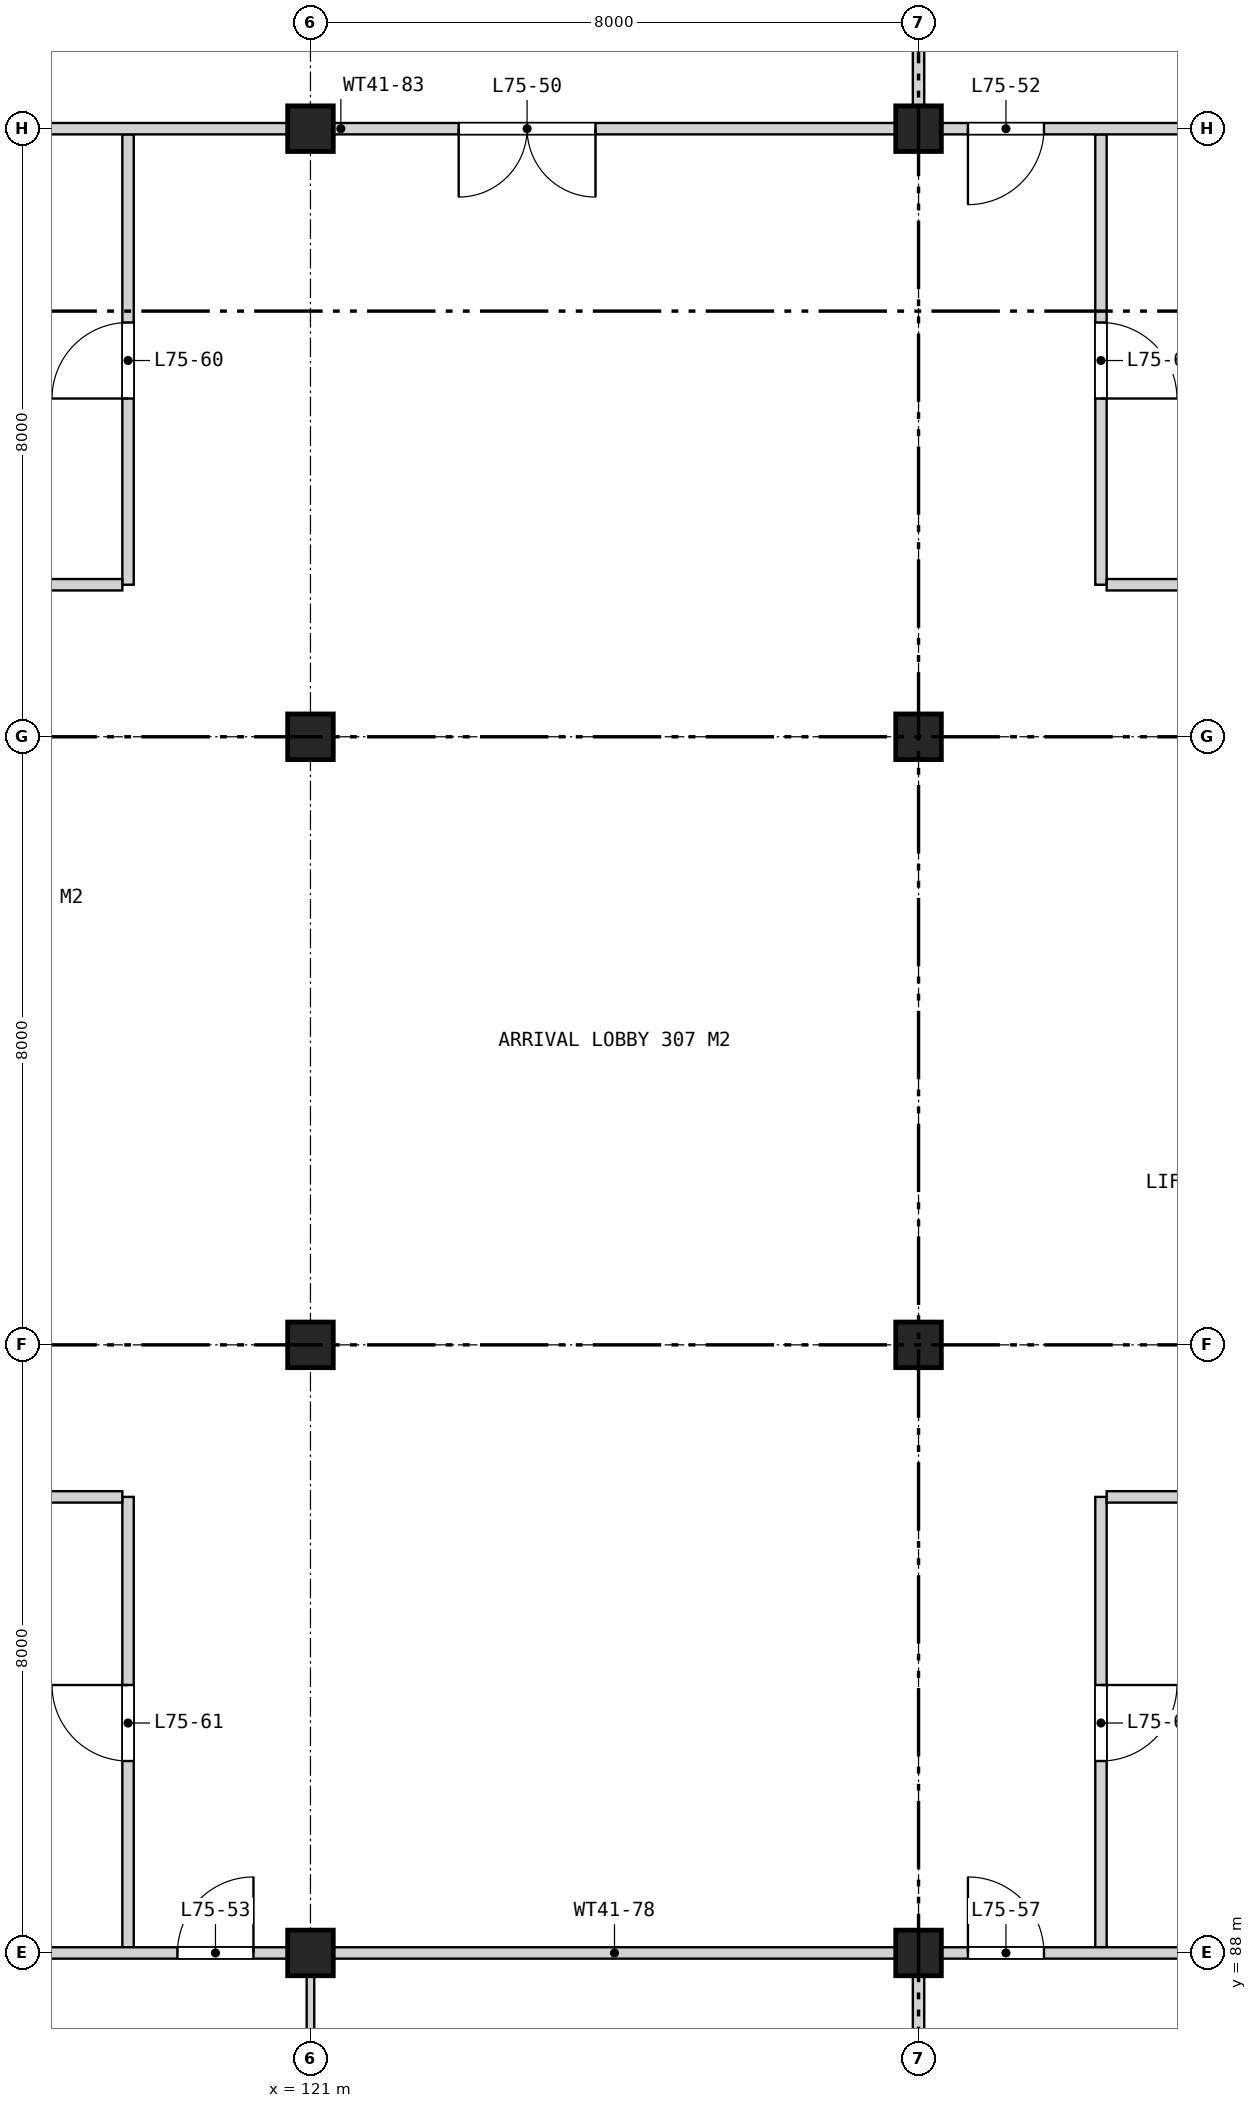
"""IFC4 building model, lengths in metres.
Left out: names, types, materials, properties, quantities, classifications, styles, units other than length and angle.
Written with IfcOpenShell. Run it as: python <this file> out.ifc"""

import sys

from ifc_helpers import new_model, si_unit, direction, frame, frame_2d, origin, origin_2d, place, context, subcontext, project, spatial, rectangle, extrude, element, fill, save


model = new_model("IFC4")
c1 = context("Model", 3, precision=1e-05, world=origin(), true_north=direction((0.0, 1.0)))
c2 = subcontext(c1, "Body", "Model", "MODEL_VIEW")
j1 = project(units=[si_unit("LENGTHUNIT", "METRE"), si_unit("PLANEANGLEUNIT", "RADIAN")], contexts=[c1])
p1 = place(None, origin())
s1 = spatial("IfcSite", under=j1, at=p1, CompositionType="ELEMENT")
p2 = place(p1, origin())
s2 = spatial("IfcBuilding", under=s1, at=p2, CompositionType="ELEMENT")
p3 = place(p2, frame((0.0, 0.0, 344.9)))
s3 = spatial("IfcBuildingStorey", under=s2, at=p3, CompositionType="ELEMENT", Elevation=344.9)
for number, where, z_axis, x_axis in (
    (1, (121.0, 88.0, 0.0), (0.0, 0.0, 1.0), (1.0, 0.0, 0.0)),
    (2, (121.0, 96.0, 0.0), (0.0, 0.0, 1.0), (1.0, 0.0, 0.0)),
    (3, (121.0, 104.0, 0.0), (0.0, 0.0, 1.0), (1.0, 0.0, 0.0)),
    (4, (121.0, 112.0, 0.0), (0.0, 0.0, 1.0), (1.0, 0.0, 0.0)),
    (5, (129.0, 88.0, 0.0), (0.0, 0.0, 1.0), (1.0, 0.0, 0.0)),
    (6, (129.0, 96.0, 0.0), (0.0, 0.0, 1.0), (1.0, 0.0, 0.0)),
    (7, (129.0, 104.0, 0.0), (0.0, 0.0, 1.0), (1.0, 0.0, 0.0)),
    (8, (129.0, 112.0, 0.0), (0.0, 0.0, 1.0), (1.0, 0.0, 0.0)),
):
    element("IfcColumn", number, at=place(p3, frame(where, z_axis=z_axis, x_axis=x_axis)), inside=s3, PredefinedType="COLUMN", context=c2, shape_type="SweptSolid", body=[
        extrude(rectangle(XDim=0.6, YDim=0.6, at=origin_2d()), origin(), (0.0, 0.0, 1.0), 4.2),
    ])
p4 = place(p3, frame((118.6, 88.075, 0.0), z_axis=(0.0, 0.0, 1.0), x_axis=(0.0, 1.0, 0.0)))
e9 = element("IfcWall", 9, at=p4, inside=s3, PredefinedType="PARTITIONING", context=c2, shape_type="SweptSolid", body=[
    extrude(rectangle(XDim=5.925, YDim=0.15, at=frame_2d((2.962, 0.0))), origin(), (0.0, 0.0, 1.0), 3.396),
])
p5 = place(p4, frame((2.45, 0.0, 0.0)))
e10 = element("IfcOpeningElement", 10, at=p5, cuts=e9, PredefinedType="OPENING", context=c2, shape_type="SweptSolid", body=[
    extrude(rectangle(XDim=1.0, YDim=2.1, at=frame_2d((0.5, 1.05))), frame((0.0, 0.085, 0.0), z_axis=(0.0, -1.0, 0.0), x_axis=(1.0, 0.0, 0.0)), (0.0, 0.0, 1.0), 0.17),
])
p6 = place(p3, frame((118.6, 106.0, 0.0), z_axis=(0.0, 0.0, 1.0), x_axis=(0.0, 1.0, 0.0)))
e11 = element("IfcWall", 11, at=p6, inside=s3, PredefinedType="PARTITIONING", context=c2, shape_type="SweptSolid", body=[
    extrude(rectangle(XDim=5.925, YDim=0.15, at=frame_2d((2.962, 0.0))), origin(), (0.0, 0.0, 1.0), 3.396),
])
p7 = place(p6, frame((2.45, 0.0, 0.0)))
e12 = element("IfcOpeningElement", 12, at=p7, cuts=e11, PredefinedType="OPENING", context=c2, shape_type="SweptSolid", body=[
    extrude(rectangle(XDim=1.0, YDim=2.1, at=frame_2d((0.5, 1.05))), frame((0.0, 0.085, 0.0), z_axis=(0.0, -1.0, 0.0), x_axis=(1.0, 0.0, 0.0)), (0.0, 0.0, 1.0), 0.17),
])
p8 = place(p3, frame((121.0, 71.78, 0.0), z_axis=(0.0, 0.0, 1.0), x_axis=(0.0, 1.0, 0.0)))
e13 = element("IfcWall", 13, at=p8, inside=s3, PredefinedType="PARTITIONING", context=c2, shape_type="SweptSolid", body=[
    extrude(rectangle(XDim=16.145, YDim=0.1, at=frame_2d((8.073, 0.0))), origin(), (0.0, 0.0, 1.0), 3.396),
])
p9 = place(p8, frame((5.77, 0.0, 0.0)))
e14 = element("IfcOpeningElement", 14, at=p9, cuts=e13, PredefinedType="OPENING", context=c2, shape_type="SweptSolid", body=[
    extrude(rectangle(XDim=0.9, YDim=2.1, at=frame_2d((0.45, 1.05))), frame((0.0, 0.06, 0.0), z_axis=(0.0, -1.0, 0.0), x_axis=(1.0, 0.0, 0.0)), (0.0, 0.0, 1.0), 0.12),
])
p10 = place(p8, frame((1.77, 0.0, 0.0)))
e15 = element("IfcOpeningElement", 15, at=p10, cuts=e13, PredefinedType="OPENING", context=c2, shape_type="SweptSolid", body=[
    extrude(rectangle(XDim=0.9, YDim=2.1, at=frame_2d((0.45, 1.05))), frame((0.0, 0.06, 0.0), z_axis=(0.0, -1.0, 0.0), x_axis=(1.0, 0.0, 0.0)), (0.0, 0.0, 1.0), 0.12),
])
p11 = place(p8, frame((11.77, 0.0, 0.0)))
e16 = element("IfcOpeningElement", 16, at=p11, cuts=e13, PredefinedType="OPENING", context=c2, shape_type="SweptSolid", body=[
    extrude(rectangle(XDim=0.9, YDim=2.1, at=frame_2d((0.45, 1.05))), frame((0.0, 0.06, 0.0), z_axis=(0.0, -1.0, 0.0), x_axis=(1.0, 0.0, 0.0)), (0.0, 0.0, 1.0), 0.12),
])
p12 = place(p3, frame((129.0, 71.78, 0.0), z_axis=(0.0, 0.0, 1.0), x_axis=(0.0, 1.0, 0.0)))
e17 = element("IfcWall", 17, at=p12, inside=s3, PredefinedType="PARTITIONING", context=c2, shape_type="SweptSolid", body=[
    extrude(rectangle(XDim=16.145, YDim=0.15, at=frame_2d((8.073, 0.0))), origin(), (0.0, 0.0, 1.0), 3.396),
])
p13 = place(p12, frame((3.77, 0.0, 0.0)))
e18 = element("IfcOpeningElement", 18, at=p13, cuts=e17, PredefinedType="OPENING", context=c2, shape_type="SweptSolid", body=[
    extrude(rectangle(XDim=0.9, YDim=2.1, at=frame_2d((0.45, 1.05))), frame((0.0, 0.085, 0.0), z_axis=(0.0, -1.0, 0.0), x_axis=(1.0, 0.0, 0.0)), (0.0, 0.0, 1.0), 0.17),
])
p14 = place(p3, frame((129.0, 112.075, 0.0), z_axis=(0.0, 0.0, 1.0), x_axis=(0.0, 1.0, 0.0)))
e19 = element("IfcWall", 19, at=p14, inside=s3, PredefinedType="PARTITIONING", context=c2, shape_type="SweptSolid", body=[
    extrude(rectangle(XDim=9.925, YDim=0.15, at=frame_2d((4.962, 0.0))), origin(), (0.0, 0.0, 1.0), 3.396),
])
p15 = place(p3, frame((131.4, 88.075, 0.0), z_axis=(0.0, 0.0, 1.0), x_axis=(0.0, 1.0, 0.0)))
e20 = element("IfcWall", 20, at=p15, inside=s3, PredefinedType="PARTITIONING", context=c2, shape_type="SweptSolid", body=[
    extrude(rectangle(XDim=5.925, YDim=0.15, at=frame_2d((2.962, 0.0))), origin(), (0.0, 0.0, 1.0), 3.396),
])
p16 = place(p15, frame((2.45, 0.0, 0.0)))
e21 = element("IfcOpeningElement", 21, at=p16, cuts=e20, PredefinedType="OPENING", context=c2, shape_type="SweptSolid", body=[
    extrude(rectangle(XDim=1.0, YDim=2.1, at=frame_2d((0.5, 1.05))), frame((0.0, 0.085, 0.0), z_axis=(0.0, -1.0, 0.0), x_axis=(1.0, 0.0, 0.0)), (0.0, 0.0, 1.0), 0.17),
])
p17 = place(p3, frame((131.4, 106.0, 0.0), z_axis=(0.0, 0.0, 1.0), x_axis=(0.0, 1.0, 0.0)))
e22 = element("IfcWall", 22, at=p17, inside=s3, PredefinedType="PARTITIONING", context=c2, shape_type="SweptSolid", body=[
    extrude(rectangle(XDim=5.925, YDim=0.15, at=frame_2d((2.962, 0.0))), origin(), (0.0, 0.0, 1.0), 3.396),
])
p18 = place(p17, frame((2.45, 0.0, 0.0)))
e23 = element("IfcOpeningElement", 23, at=p18, cuts=e22, PredefinedType="OPENING", context=c2, shape_type="SweptSolid", body=[
    extrude(rectangle(XDim=1.0, YDim=2.1, at=frame_2d((0.5, 1.05))), frame((0.0, 0.085, 0.0), z_axis=(0.0, -1.0, 0.0), x_axis=(1.0, 0.0, 0.0)), (0.0, 0.0, 1.0), 0.17),
])
p19 = place(p3, frame((113.0, 88.0, 0.0), z_axis=(0.0, 0.0, 1.0), x_axis=(1.0, 0.0, 0.0)))
e24 = element("IfcWall", 24, at=p19, inside=s3, PredefinedType="PARTITIONING", context=c2, shape_type="SweptSolid", body=[
    extrude(rectangle(XDim=24.0, YDim=0.15, at=frame_2d((12.0, 0.0))), origin(), (0.0, 0.0, 1.0), 3.396),
])
p20 = place(p19, frame((6.25, 0.0, 0.0)))
e25 = element("IfcOpeningElement", 25, at=p20, cuts=e24, PredefinedType="OPENING", context=c2, shape_type="SweptSolid", body=[
    extrude(rectangle(XDim=1.0, YDim=2.1, at=frame_2d((0.5, 1.05))), frame((0.0, 0.085, 0.0), z_axis=(0.0, -1.0, 0.0), x_axis=(1.0, 0.0, 0.0)), (0.0, 0.0, 1.0), 0.17),
])
p21 = place(p19, frame((16.65, 0.0, 0.0)))
e26 = element("IfcOpeningElement", 26, at=p21, cuts=e24, PredefinedType="OPENING", context=c2, shape_type="SweptSolid", body=[
    extrude(rectangle(XDim=1.0, YDim=2.1, at=frame_2d((0.5, 1.05))), frame((0.0, 0.085, 0.0), z_axis=(0.0, -1.0, 0.0), x_axis=(1.0, 0.0, 0.0)), (0.0, 0.0, 1.0), 0.17),
])
for number, where, z_axis, x_axis in (
    (27, (113.0, 94.0, 0.0), (0.0, 0.0, 1.0), (1.0, 0.0, 0.0)),
    (28, (131.475, 94.0, 0.0), (0.0, 0.0, 1.0), (1.0, 0.0, 0.0)),
    (29, (113.0, 106.0, 0.0), (0.0, 0.0, 1.0), (1.0, 0.0, 0.0)),
    (30, (131.475, 106.0, 0.0), (0.0, 0.0, 1.0), (1.0, 0.0, 0.0)),
):
    element("IfcWall", number, at=place(p3, frame(where, z_axis=z_axis, x_axis=x_axis)), inside=s3, PredefinedType="PARTITIONING", context=c2, shape_type="SweptSolid", body=[
        extrude(rectangle(XDim=5.525, YDim=0.15, at=frame_2d((2.762, 0.0))), origin(), (0.0, 0.0, 1.0), 3.396),
    ])
p22 = place(p3, frame((113.0, 112.0, 0.0), z_axis=(0.0, 0.0, 1.0), x_axis=(1.0, 0.0, 0.0)))
e31 = element("IfcWall", 31, at=p22, inside=s3, PredefinedType="PARTITIONING", context=c2, shape_type="SweptSolid", body=[
    extrude(rectangle(XDim=24.0, YDim=0.15, at=frame_2d((12.0, 0.0))), origin(), (0.0, 0.0, 1.0), 3.396),
])
p23 = place(p22, frame((9.95, 0.0, 0.0)))
e32 = element("IfcOpeningElement", 32, at=p23, cuts=e31, PredefinedType="OPENING", context=c2, shape_type="SweptSolid", body=[
    extrude(rectangle(XDim=1.8, YDim=2.1, at=frame_2d((0.9, 1.05))), frame((0.0, 0.085, 0.0), z_axis=(0.0, -1.0, 0.0), x_axis=(1.0, 0.0, 0.0)), (0.0, 0.0, 1.0), 0.17),
])
p24 = place(p22, frame((16.65, 0.0, 0.0)))
e33 = element("IfcOpeningElement", 33, at=p24, cuts=e31, PredefinedType="OPENING", context=c2, shape_type="SweptSolid", body=[
    extrude(rectangle(XDim=1.0, YDim=2.1, at=frame_2d((0.5, 1.05))), frame((0.0, 0.085, 0.0), z_axis=(0.0, -1.0, 0.0), x_axis=(1.0, 0.0, 0.0)), (0.0, 0.0, 1.0), 0.17),
])
p25 = place(p23, frame((1.8, 0.0, 0.0), z_axis=(0.0, 0.0, 1.0), x_axis=(-1.0, 0.0, 0.0)))
e34 = element("IfcDoor", 34, at=p25, inside=s3, OperationType="DOUBLE_DOOR_SINGLE_SWING", PredefinedType="DOOR", context=c2, shape_type="SweptSolid", body=[
    extrude(rectangle(XDim=1.8, YDim=2.1, at=frame_2d((0.9, 1.05))), frame((0.0, 0.025, 0.0), z_axis=(0.0, -1.0, 0.0), x_axis=(1.0, 0.0, 0.0)), (0.0, 0.0, 1.0), 0.05),
])
fill(e32, e34)
p26 = place(p24, frame((1.0, 0.0, 0.0), z_axis=(0.0, 0.0, 1.0), x_axis=(-1.0, 0.0, 0.0)))
e35 = element("IfcDoor", 35, at=p26, inside=s3, OperationType="SINGLE_SWING_RIGHT", PredefinedType="DOOR", context=c2, shape_type="SweptSolid", body=[
    extrude(rectangle(XDim=1.0, YDim=2.1, at=frame_2d((0.5, 1.05))), frame((0.0, 0.025, 0.0), z_axis=(0.0, -1.0, 0.0), x_axis=(1.0, 0.0, 0.0)), (0.0, 0.0, 1.0), 0.05),
])
fill(e33, e35)
p27 = place(p20, origin())
e36 = element("IfcDoor", 36, at=p27, inside=s3, OperationType="SINGLE_SWING_RIGHT", PredefinedType="DOOR", context=c2, shape_type="SweptSolid", body=[
    extrude(rectangle(XDim=1.0, YDim=2.1, at=frame_2d((0.5, 1.05))), frame((0.0, 0.025, 0.0), z_axis=(0.0, -1.0, 0.0), x_axis=(1.0, 0.0, 0.0)), (0.0, 0.0, 1.0), 0.05),
])
fill(e25, e36)
p28 = place(p21, origin())
e37 = element("IfcDoor", 37, at=p28, inside=s3, OperationType="SINGLE_SWING_LEFT", PredefinedType="DOOR", context=c2, shape_type="SweptSolid", body=[
    extrude(rectangle(XDim=1.0, YDim=2.1, at=frame_2d((0.5, 1.05))), frame((0.0, 0.025, 0.0), z_axis=(0.0, -1.0, 0.0), x_axis=(1.0, 0.0, 0.0)), (0.0, 0.0, 1.0), 0.05),
])
fill(e26, e37)
p29 = place(p7, origin())
e38 = element("IfcDoor", 38, at=p29, inside=s3, OperationType="SINGLE_SWING_LEFT", PredefinedType="DOOR", context=c2, shape_type="SweptSolid", body=[
    extrude(rectangle(XDim=1.0, YDim=2.1, at=frame_2d((0.5, 1.05))), frame((0.0, 0.025, 0.0), z_axis=(0.0, -1.0, 0.0), x_axis=(1.0, 0.0, 0.0)), (0.0, 0.0, 1.0), 0.05),
])
fill(e12, e38)
p30 = place(p5, origin())
e39 = element("IfcDoor", 39, at=p30, inside=s3, OperationType="SINGLE_SWING_RIGHT", PredefinedType="DOOR", context=c2, shape_type="SweptSolid", body=[
    extrude(rectangle(XDim=1.0, YDim=2.1, at=frame_2d((0.5, 1.05))), frame((0.0, 0.025, 0.0), z_axis=(0.0, -1.0, 0.0), x_axis=(1.0, 0.0, 0.0)), (0.0, 0.0, 1.0), 0.05),
])
fill(e10, e39)
p31 = place(p16, frame((1.0, 0.0, 0.0), z_axis=(0.0, 0.0, 1.0), x_axis=(-1.0, 0.0, 0.0)))
e40 = element("IfcDoor", 40, at=p31, inside=s3, OperationType="SINGLE_SWING_LEFT", PredefinedType="DOOR", context=c2, shape_type="SweptSolid", body=[
    extrude(rectangle(XDim=1.0, YDim=2.1, at=frame_2d((0.5, 1.05))), frame((0.0, 0.025, 0.0), z_axis=(0.0, -1.0, 0.0), x_axis=(1.0, 0.0, 0.0)), (0.0, 0.0, 1.0), 0.05),
])
fill(e21, e40)
p32 = place(p18, frame((1.0, 0.0, 0.0), z_axis=(0.0, 0.0, 1.0), x_axis=(-1.0, 0.0, 0.0)))
e41 = element("IfcDoor", 41, at=p32, inside=s3, OperationType="SINGLE_SWING_RIGHT", PredefinedType="DOOR", context=c2, shape_type="SweptSolid", body=[
    extrude(rectangle(XDim=1.0, YDim=2.1, at=frame_2d((0.5, 1.05))), frame((0.0, 0.025, 0.0), z_axis=(0.0, -1.0, 0.0), x_axis=(1.0, 0.0, 0.0)), (0.0, 0.0, 1.0), 0.05),
])
fill(e23, e41)
save(model, sys.argv[1])
